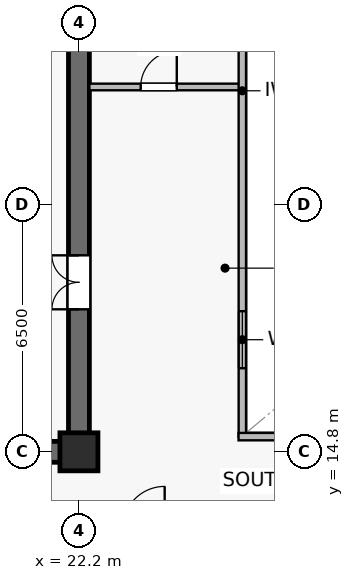
"""IFC4 building model, lengths in metres.
Left out: names, types, materials, properties, quantities, classifications, styles, units other than length and angle.
Written with IfcOpenShell. Run it as: python <this file> out.ifc"""

import sys

from ifc_helpers import new_model, si_unit, direction, frame, frame_2d, origin, origin_2d, place, context, subcontext, project, spatial, rectangle, extrude, source, transform, mapped, element, fill, save


model = new_model("IFC4")
c1 = context("Model", 3, precision=1e-05, world=origin(), true_north=direction((0.0, 1.0)))
c2 = subcontext(c1, "Body", "Model", "MODEL_VIEW")
j1 = project(units=[si_unit("LENGTHUNIT", "METRE"), si_unit("PLANEANGLEUNIT", "RADIAN")], contexts=[c1])
p1 = place(None, origin())
s1 = spatial("IfcSite", under=j1, at=p1, CompositionType="ELEMENT")
p2 = place(p1, origin())
s2 = spatial("IfcBuilding", under=s1, at=p2, CompositionType="ELEMENT")
p3 = place(p2, frame((0.0, 0.0, 250.6)))
s3 = spatial("IfcBuildingStorey", under=s2, at=p3, CompositionType="ELEMENT", Elevation=250.6)
p4 = place(p3, frame((7.125, 14.8, 0.0), z_axis=(0.0, 0.0, 1.0), x_axis=(1.0, 0.0, 0.0)))
e1 = element("IfcWall", 1, at=p4, inside=s3, PredefinedType="SHEAR", context=c2, shape_type="SweptSolid", body=[
    extrude(rectangle(XDim=15.35, YDim=0.55, at=frame_2d((7.675, 0.0))), origin(), (0.0, 0.0, 1.0), 3.8),
])
p5 = place(p3, frame((22.2, 15.075, 0.0), z_axis=(0.0, 0.0, 1.0), x_axis=(0.0, 1.0, 0.0)))
e2 = element("IfcWall", 2, at=p5, inside=s3, PredefinedType="SHEAR", context=c2, shape_type="SweptSolid", body=[
    extrude(rectangle(XDim=18.45, YDim=0.55, at=frame_2d((9.225, 0.0))), origin(), (0.0, 0.0, 1.0), 3.8),
])
p6 = place(p5, frame((3.475, 0.0, 0.0)))
e3 = element("IfcOpeningElement", 3, at=p6, cuts=e2, PredefinedType="OPENING", context=c2, shape_type="SweptSolid", body=[
    extrude(rectangle(XDim=1.42, YDim=2.2, at=frame_2d((0.71, 1.1))), frame((0.0, 0.285, 0.0), z_axis=(0.0, -1.0, 0.0), x_axis=(1.0, 0.0, 0.0)), (0.0, 0.0, 1.0), 0.57),
])
m1 = source(origin(), c2, "Body", "SweptSolid", [
    extrude(rectangle(XDim=1.0, YDim=1.0, at=origin_2d()), origin(), (0.0, 0.0, 1.0), 4.1),
])
p7 = place(p3, frame((22.2, 14.8, 0.0), z_axis=(0.0, 0.0, 1.0), x_axis=(1.0, 0.0, 0.0)))
e4 = element("IfcColumn", 4, at=p7, inside=s3, PredefinedType="COLUMN", context=c2, shape_type="MappedRepresentation", body=[
    mapped(m1, transform((0.0, 0.0, 0.0), scale=1.0)),
])
p8 = place(p3, frame((22.475, 24.4, 0.0), z_axis=(0.0, 0.0, 1.0), x_axis=(1.0, 0.0, 0.0)))
e5 = element("IfcWall", 5, at=p8, inside=s3, PredefinedType="PARTITIONING", context=c2, shape_type="SweptSolid", body=[
    extrude(rectangle(XDim=4.025, YDim=0.175, at=frame_2d((2.012, 0.0))), origin(), (0.0, 0.0, 1.0), 3.8),
])
p9 = place(p8, frame((1.35, 0.0, 0.0)))
e6 = element("IfcOpeningElement", 6, at=p9, cuts=e5, PredefinedType="OPENING", context=c2, shape_type="SweptSolid", body=[
    extrude(rectangle(XDim=0.95, YDim=2.15, at=frame_2d((0.475, 1.075))), frame((0.0, 0.098, 0.0), z_axis=(0.0, -1.0, 0.0), x_axis=(1.0, 0.0, 0.0)), (0.0, 0.0, 1.0), 0.195),
])
p10 = place(p3, frame((26.5, 15.2, 0.0), z_axis=(0.0, 0.0, 1.0), x_axis=(0.0, 1.0, 0.0)))
e7 = element("IfcWall", 7, at=p10, inside=s3, PredefinedType="SOLIDWALL", context=c2, shape_type="SweptSolid", body=[
    extrude(rectangle(XDim=18.2, YDim=0.195, at=frame_2d((9.1, 0.0))), origin(), (0.0, 0.0, 1.0), 3.8),
])
p11 = place(p10, frame((1.8, 0.0, 0.9)))
e8 = element("IfcOpeningElement", 8, at=p11, cuts=e7, PredefinedType="OPENING", context=c2, shape_type="SweptSolid", body=[
    extrude(rectangle(XDim=1.5, YDim=1.4, at=frame_2d((0.75, 0.7))), frame((0.0, 0.107, 0.0), z_axis=(0.0, -1.0, 0.0), x_axis=(1.0, 0.0, 0.0)), (0.0, 0.0, 1.0), 0.215),
])
p12 = place(p10, frame((13.2, 0.0, 0.9)))
e9 = element("IfcOpeningElement", 9, at=p12, cuts=e7, PredefinedType="OPENING", context=c2, shape_type="SweptSolid", body=[
    extrude(rectangle(XDim=1.5, YDim=1.4, at=frame_2d((0.75, 0.7))), frame((0.0, 0.107, 0.0), z_axis=(0.0, -1.0, 0.0), x_axis=(1.0, 0.0, 0.0)), (0.0, 0.0, 1.0), 0.215),
])
p13 = place(p3, frame((26.4, 15.2, 0.0), z_axis=(0.0, 0.0, 1.0), x_axis=(1.0, 0.0, 0.0)))
e10 = element("IfcWall", 10, at=p13, inside=s3, PredefinedType="SOLIDWALL", context=c2, shape_type="SweptSolid", body=[
    extrude(rectangle(XDim=22.0, YDim=0.195, at=frame_2d((11.0, 0.0))), origin(), (0.0, 0.0, 1.0), 3.8),
])
m2 = source(origin(), c2, "Body", "SweptSolid", [
    extrude(rectangle(XDim=1.5, YDim=1.4, at=frame_2d((0.75, 0.7))), frame((0.0, 0.03, 0.0), z_axis=(0.0, -1.0, 0.0), x_axis=(1.0, 0.0, 0.0)), (0.0, 0.0, 1.0), 0.06),
])
p14 = place(p11, origin())
e11 = element("IfcWindow", 11, at=p14, inside=s3, PartitioningType="SINGLE_PANEL", PredefinedType="WINDOW", context=c2, shape_type="MappedRepresentation", body=[
    mapped(m2, transform((0.0, 0.0, 0.0), scale=1.0)),
])
fill(e8, e11)
m3 = source(origin(), c2, "Body", "SweptSolid", [
    extrude(rectangle(XDim=1.42, YDim=2.2, at=frame_2d((0.71, 1.1))), frame((0.0, 0.025, 0.0), z_axis=(0.0, -1.0, 0.0), x_axis=(1.0, 0.0, 0.0)), (0.0, 0.0, 1.0), 0.05),
])
p15 = place(p6, origin())
e12 = element("IfcDoor", 12, at=p15, inside=s3, OperationType="DOUBLE_DOOR_SINGLE_SWING", PredefinedType="DOOR", context=c2, shape_type="MappedRepresentation", body=[
    mapped(m3, transform((0.0, 0.0, 0.0), scale=1.0)),
])
fill(e3, e12)
m4 = source(origin(), c2, "Body", "SweptSolid", [
    extrude(rectangle(XDim=0.95, YDim=2.15, at=frame_2d((0.475, 1.075))), frame((0.0, 0.025, 0.0), z_axis=(0.0, -1.0, 0.0), x_axis=(1.0, 0.0, 0.0)), (0.0, 0.0, 1.0), 0.05),
])
p16 = place(p9, origin())
e13 = element("IfcDoor", 13, at=p16, inside=s3, OperationType="SINGLE_SWING_RIGHT", PredefinedType="DOOR", context=c2, shape_type="MappedRepresentation", body=[
    mapped(m4, transform((0.0, 0.0, 0.0), scale=1.0)),
])
fill(e6, e13)
save(model, sys.argv[1])
